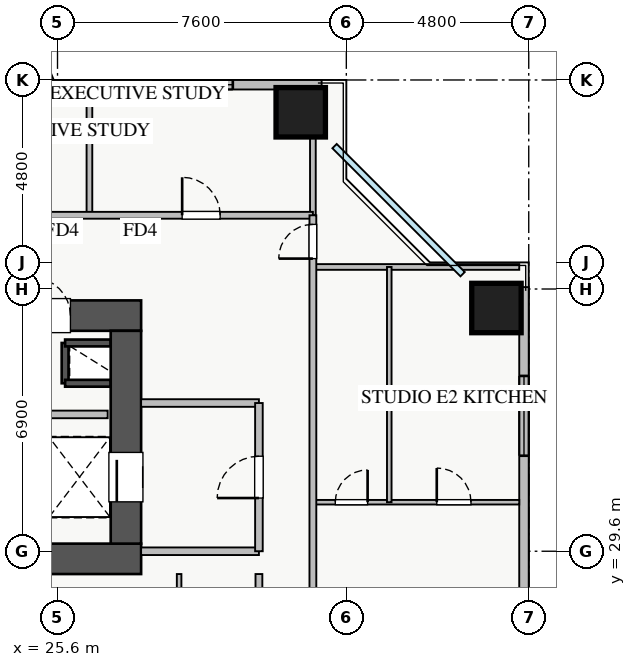
"""IFC4 building model, lengths in metres.
Left out: names, types, materials, properties, quantities, classifications, styles, units other than length and angle.
Written with IfcOpenShell. Run it as: python <this file> out.ifc"""

import sys

from ifc_helpers import new_model, si_unit, direction, frame, frame_2d, origin, origin_2d, place, context, subcontext, project, spatial, rectangle, extrude, source, transform, mapped, element, fill, save


model = new_model("IFC4")
c1 = context("Model", 3, precision=1e-05, world=origin(), true_north=direction((0.0, 1.0)))
c2 = subcontext(c1, "Body", "Model", "MODEL_VIEW")
j1 = project(units=[si_unit("LENGTHUNIT", "METRE"), si_unit("PLANEANGLEUNIT", "RADIAN")], contexts=[c1])
p1 = place(None, origin())
s1 = spatial("IfcSite", under=j1, at=p1, CompositionType="ELEMENT")
p2 = place(p1, origin())
s2 = spatial("IfcBuilding", under=s1, at=p2, CompositionType="ELEMENT")
p3 = place(p2, frame((0.0, 0.0, 76.25)))
s3 = spatial("IfcBuildingStorey", under=s2, at=p3, CompositionType="ELEMENT", Elevation=76.25)
p4 = place(p3, frame((25.8, 34.02, 0.0), z_axis=(0.0, 0.0, 1.0), x_axis=(0.0, 1.0, 0.0)))
e1 = element("IfcWall", 1, at=p4, inside=s3, PredefinedType="SHEAR", context=c2, shape_type="SweptSolid", body=[
    extrude(rectangle(XDim=1.06, YDim=0.18, at=frame_2d((0.53, 0.0))), origin(), (0.0, 0.0, 1.0), 3.07),
])
for number, where, z_axis, x_axis in (
    (2, (25.8, 35.08, 0.0), (0.0, 0.0, 1.0), (1.0, 0.0, 0.0)),
    (3, (25.8, 34.02, 0.0), (0.0, 0.0, 1.0), (1.0, 0.0, 0.0)),
):
    element("IfcWall", number, at=place(p3, frame(where, z_axis=z_axis, x_axis=x_axis)), inside=s3, PredefinedType="SHEAR", context=c2, shape_type="SweptSolid", body=[
        extrude(rectangle(XDim=1.2, YDim=0.18, at=frame_2d((0.6, 0.0))), origin(), (0.0, 0.0, 1.0), 3.07),
    ])
p5 = place(p3, frame((10.2, 29.4, 0.0), z_axis=(0.0, 0.0, 1.0), x_axis=(1.0, 0.0, 0.0)))
e4 = element("IfcWall", 4, at=p5, inside=s3, PredefinedType="SHEAR", context=c2, shape_type="SweptSolid", body=[
    extrude(rectangle(XDim=17.6, YDim=0.8, at=frame_2d((8.8, 0.0))), origin(), (0.0, 0.0, 1.0), 3.25),
])
p6 = place(p3, frame((10.2, 35.8, 0.0), z_axis=(0.0, 0.0, 1.0), x_axis=(1.0, 0.0, 0.0)))
e5 = element("IfcWall", 5, at=p6, inside=s3, PredefinedType="SHEAR", context=c2, shape_type="SweptSolid", body=[
    extrude(rectangle(XDim=17.6, YDim=0.8, at=frame_2d((8.8, 0.0))), origin(), (0.0, 0.0, 1.0), 3.25),
])
p7 = place(p6, frame((1.15, 0.0, 0.0)))
e6 = element("IfcOpeningElement", 6, at=p7, cuts=e5, PredefinedType="OPENING", context=c2, shape_type="SweptSolid", body=[
    extrude(rectangle(XDim=1.1, YDim=2.05, at=frame_2d((0.55, 1.025))), frame((0.0, 0.41, 0.0), z_axis=(0.0, -1.0, 0.0), x_axis=(1.0, 0.0, 0.0)), (0.0, 0.0, 1.0), 0.82),
])
p8 = place(p6, frame((8.3, 0.0, 0.0)))
e7 = element("IfcOpeningElement", 7, at=p8, cuts=e5, PredefinedType="OPENING", context=c2, shape_type="SweptSolid", body=[
    extrude(rectangle(XDim=1.1, YDim=2.05, at=frame_2d((0.55, 1.025))), frame((0.0, 0.41, 0.0), z_axis=(0.0, -1.0, 0.0), x_axis=(1.0, 0.0, 0.0)), (0.0, 0.0, 1.0), 0.82),
])
p9 = place(p6, frame((10.05, 0.0, 0.0)))
e8 = element("IfcOpeningElement", 8, at=p9, cuts=e5, PredefinedType="OPENING", context=c2, shape_type="SweptSolid", body=[
    extrude(rectangle(XDim=1.1, YDim=2.05, at=frame_2d((0.55, 1.025))), frame((0.0, 0.41, 0.0), z_axis=(0.0, -1.0, 0.0), x_axis=(1.0, 0.0, 0.0)), (0.0, 0.0, 1.0), 0.82),
])
p10 = place(p6, frame((14.74, 0.0, 0.0)))
e9 = element("IfcOpeningElement", 9, at=p10, cuts=e5, PredefinedType="OPENING", context=c2, shape_type="SweptSolid", body=[
    extrude(rectangle(XDim=1.0, YDim=2.05, at=frame_2d((0.5, 1.025))), frame((0.0, 0.41, 0.0), z_axis=(0.0, -1.0, 0.0), x_axis=(1.0, 0.0, 0.0)), (0.0, 0.0, 1.0), 0.82),
])
p11 = place(p6, frame((12.585, 0.0, 0.0)))
e10 = element("IfcOpeningElement", 10, at=p11, cuts=e5, PredefinedType="OPENING", context=c2, shape_type="SweptSolid", body=[
    extrude(rectangle(XDim=1.0, YDim=2.05, at=frame_2d((0.5, 1.025))), frame((0.0, 0.41, 0.0), z_axis=(0.0, -1.0, 0.0), x_axis=(1.0, 0.0, 0.0)), (0.0, 0.0, 1.0), 0.82),
])
p12 = place(p3, frame((27.4, 29.8, 0.0), z_axis=(0.0, 0.0, 1.0), x_axis=(0.0, 1.0, 0.0)))
e11 = element("IfcWall", 11, at=p12, inside=s3, PredefinedType="SHEAR", context=c2, shape_type="SweptSolid", body=[
    extrude(rectangle(XDim=5.6, YDim=0.8, at=frame_2d((2.8, 0.0))), origin(), (0.0, 0.0, 1.0), 3.25),
])
p13 = place(p12, frame((1.1, 0.0, 0.0)))
e12 = element("IfcOpeningElement", 12, at=p13, cuts=e11, PredefinedType="OPENING", context=c2, shape_type="SweptSolid", body=[
    extrude(rectangle(XDim=1.3, YDim=2.05, at=frame_2d((0.65, 1.025))), frame((0.0, 0.41, 0.0), z_axis=(0.0, -1.0, 0.0), x_axis=(1.0, 0.0, 0.0)), (0.0, 0.0, 1.0), 0.82),
])
m1 = source(origin(), c2, "Body", "SweptSolid", [
    extrude(rectangle(XDim=1.3, YDim=1.3, at=origin_2d()), origin(), (0.0, 0.0, 1.0), 3.25),
])
for number, where, z_axis, x_axis in (
    (13, (37.15, 36.0, 0.0), (0.0, 0.0, 1.0), (1.0, 0.0, 0.0)),
    (14, (32.0, 41.15, 0.0), (0.0, 0.0, 1.0), (1.0, 0.0, 0.0)),
):
    element("IfcColumn", number, at=place(p3, frame(where, z_axis=z_axis, x_axis=x_axis)), inside=s3, PredefinedType="COLUMN", context=c2, shape_type="MappedRepresentation", body=[
        mapped(m1, transform((0.0, 0.0, 0.0), x_axis=(1.0, 0.0, 0.0), y_axis=(0.0, 1.0, 0.0), z_axis=(0.0, 0.0, 1.0), scale=1.0)),
    ])
p14 = place(p3, frame((5.45, 41.875, 0.0), z_axis=(0.0, 0.0, 1.0), x_axis=(1.0, 0.0, 0.0)))
e15 = element("IfcWall", 15, at=p14, inside=s3, PredefinedType="STANDARD", context=c2, shape_type="SweptSolid", body=[
    extrude(rectangle(XDim=27.1, YDim=0.25, at=frame_2d((13.55, 0.0))), origin(), (0.0, 0.0, 1.0), 2.61),
])
p15 = place(p14, frame((14.4, 0.0, 0.0)))
e16 = element("IfcOpeningElement", 16, at=p15, cuts=e15, PredefinedType="OPENING", context=c2, shape_type="SweptSolid", body=[
    extrude(rectangle(XDim=1.2, YDim=2.1, at=frame_2d((0.6, 1.05))), frame((0.0, 0.135, 0.0), z_axis=(0.0, -1.0, 0.0), x_axis=(1.0, 0.0, 0.0)), (0.0, 0.0, 1.0), 0.27),
])
p16 = place(p14, frame((1.48, 0.0, 0.9)))
e17 = element("IfcOpeningElement", 17, at=p16, cuts=e15, PredefinedType="OPENING", context=c2, shape_type="SweptSolid", body=[
    extrude(rectangle(XDim=1.5, YDim=1.5, at=frame_2d((0.75, 0.75))), frame((0.0, 0.135, 0.0), z_axis=(0.0, -1.0, 0.0), x_axis=(1.0, 0.0, 0.0)), (0.0, 0.0, 1.0), 0.27),
])
p17 = place(p14, frame((7.725, 0.0, 0.9)))
e18 = element("IfcOpeningElement", 18, at=p17, cuts=e15, PredefinedType="OPENING", context=c2, shape_type="SweptSolid", body=[
    extrude(rectangle(XDim=1.8, YDim=1.5, at=frame_2d((0.9, 0.75))), frame((0.0, 0.135, 0.0), z_axis=(0.0, -1.0, 0.0), x_axis=(1.0, 0.0, 0.0)), (0.0, 0.0, 1.0), 0.27),
])
p18 = place(p14, frame((17.92, 0.0, 0.9)))
e19 = element("IfcOpeningElement", 19, at=p18, cuts=e15, PredefinedType="OPENING", context=c2, shape_type="SweptSolid", body=[
    extrude(rectangle(XDim=1.5, YDim=1.5, at=frame_2d((0.75, 0.75))), frame((0.0, 0.135, 0.0), z_axis=(0.0, -1.0, 0.0), x_axis=(1.0, 0.0, 0.0)), (0.0, 0.0, 1.0), 0.27),
])
p19 = place(p14, frame((22.663, 0.0, 0.9)))
e20 = element("IfcOpeningElement", 20, at=p19, cuts=e15, PredefinedType="OPENING", context=c2, shape_type="SweptSolid", body=[
    extrude(rectangle(XDim=2.1, YDim=1.48, at=frame_2d((1.05, 0.74))), frame((0.0, 0.135, 0.0), z_axis=(0.0, -1.0, 0.0), x_axis=(1.0, 0.0, 0.0)), (0.0, 0.0, 1.0), 0.27),
])
p20 = place(p14, frame((5.114, 0.0, 0.9)))
e21 = element("IfcOpeningElement", 21, at=p20, cuts=e15, PredefinedType="OPENING", context=c2, shape_type="SweptSolid", body=[
    extrude(rectangle(XDim=2.4, YDim=1.5, at=frame_2d((1.2, 0.75))), frame((0.0, 0.135, 0.0), z_axis=(0.0, -1.0, 0.0), x_axis=(1.0, 0.0, 0.0)), (0.0, 0.0, 1.0), 0.27),
])
p21 = place(p14, frame((10.893, 0.0, 0.9)))
e22 = element("IfcOpeningElement", 22, at=p21, cuts=e15, PredefinedType="OPENING", context=c2, shape_type="SweptSolid", body=[
    extrude(rectangle(XDim=2.4, YDim=1.5, at=frame_2d((1.2, 0.75))), frame((0.0, 0.135, 0.0), z_axis=(0.0, -1.0, 0.0), x_axis=(1.0, 0.0, 0.0)), (0.0, 0.0, 1.0), 0.27),
])
p22 = place(p3, frame((37.875, 9.45, 0.0), z_axis=(0.0, 0.0, 1.0), x_axis=(0.0, 1.0, 0.0)))
e23 = element("IfcWall", 23, at=p22, inside=s3, PredefinedType="STANDARD", context=c2, shape_type="SweptSolid", body=[
    extrude(rectangle(XDim=27.1, YDim=0.25, at=frame_2d((13.55, 0.0))), origin(), (0.0, 0.0, 1.0), 2.61),
])
p23 = place(p22, frame((14.4, 0.0, 0.0)))
e24 = element("IfcOpeningElement", 24, at=p23, cuts=e23, PredefinedType="OPENING", context=c2, shape_type="SweptSolid", body=[
    extrude(rectangle(XDim=1.2, YDim=2.1, at=frame_2d((0.6, 1.05))), frame((0.0, 0.135, 0.0), z_axis=(0.0, -1.0, 0.0), x_axis=(1.0, 0.0, 0.0)), (0.0, 0.0, 1.0), 0.27),
])
p24 = place(p22, frame((2.188, 0.0, 0.9)))
e25 = element("IfcOpeningElement", 25, at=p24, cuts=e23, PredefinedType="OPENING", context=c2, shape_type="SweptSolid", body=[
    extrude(rectangle(XDim=2.4, YDim=1.48, at=frame_2d((1.2, 0.74))), frame((0.0, 0.135, 0.0), z_axis=(0.0, -1.0, 0.0), x_axis=(1.0, 0.0, 0.0)), (0.0, 0.0, 1.0), 0.27),
])
p25 = place(p22, frame((22.663, 0.0, 0.9)))
e26 = element("IfcOpeningElement", 26, at=p25, cuts=e23, PredefinedType="OPENING", context=c2, shape_type="SweptSolid", body=[
    extrude(rectangle(XDim=2.1, YDim=1.48, at=frame_2d((1.05, 0.74))), frame((0.0, 0.135, 0.0), z_axis=(0.0, -1.0, 0.0), x_axis=(1.0, 0.0, 0.0)), (0.0, 0.0, 1.0), 0.27),
])
p26 = place(p22, frame((17.365, 0.0, 0.9)))
e27 = element("IfcOpeningElement", 27, at=p26, cuts=e23, PredefinedType="OPENING", context=c2, shape_type="SweptSolid", body=[
    extrude(rectangle(XDim=0.9, YDim=1.2, at=frame_2d((0.45, 0.6))), frame((0.0, 0.135, 0.0), z_axis=(0.0, -1.0, 0.0), x_axis=(1.0, 0.0, 0.0)), (0.0, 0.0, 1.0), 0.27),
])
for number, where, z_axis, x_axis in (
    (28, (27.8, 29.6, 0.0), (0.0, 0.0, 1.0), (1.0, 0.0, 0.0)),
    (29, (27.8, 33.5, 0.0), (0.0, 0.0, 1.0), (1.0, 0.0, 0.0)),
):
    element("IfcWall", number, at=place(p3, frame(where, z_axis=z_axis, x_axis=x_axis)), inside=s3, PredefinedType="PARTITIONING", context=c2, shape_type="SweptSolid", body=[
        extrude(rectangle(XDim=3.1, YDim=0.2, at=frame_2d((1.55, 0.0))), origin(), (0.0, 0.0, 1.0), 3.07),
    ])
p27 = place(p3, frame((30.9, 29.6, 0.0), z_axis=(0.0, 0.0, 1.0), x_axis=(0.0, 1.0, 0.0)))
e30 = element("IfcWall", 30, at=p27, inside=s3, PredefinedType="PARTITIONING", context=c2, shape_type="SweptSolid", body=[
    extrude(rectangle(XDim=3.9, YDim=0.2, at=frame_2d((1.95, 0.0))), origin(), (0.0, 0.0, 1.0), 3.07),
])
p28 = place(p27, frame((1.4, 0.0, 0.0)))
e31 = element("IfcOpeningElement", 31, at=p28, cuts=e30, PredefinedType="OPENING", context=c2, shape_type="SweptSolid", body=[
    extrude(rectangle(XDim=1.1, YDim=2.05, at=frame_2d((0.55, 1.025))), frame((0.0, 0.11, 0.0), z_axis=(0.0, -1.0, 0.0), x_axis=(1.0, 0.0, 0.0)), (0.0, 0.0, 1.0), 0.22),
])
p29 = place(p3, frame((21.75, 33.2, 0.0), z_axis=(0.0, 0.0, 1.0), x_axis=(1.0, 0.0, 0.0)))
e32 = element("IfcWall", 32, at=p29, inside=s3, PredefinedType="PARTITIONING", context=c2, shape_type="SweptSolid", body=[
    extrude(rectangle(XDim=5.17, YDim=0.2, at=frame_2d((2.585, 0.0))), origin(), (0.0, 0.0, 1.0), 3.07),
])
for number, where, z_axis, x_axis in (
    (33, (26.44, 38.44, 0.0), (0.0, 0.0, 1.0), (0.0, 1.0, 0.0)),
    (34, (32.32, 38.44, 0.0), (0.0, 0.0, 1.0), (0.0, 1.0, 0.0)),
):
    element("IfcWall", number, at=place(p3, frame(where, z_axis=z_axis, x_axis=x_axis)), inside=s3, PredefinedType="PARTITIONING", context=c2, shape_type="SweptSolid", body=[
        extrude(rectangle(XDim=3.31, YDim=0.15, at=frame_2d((1.655, 0.0))), origin(), (0.0, 0.0, 1.0), 3.07),
    ])
p30 = place(p3, frame((8.78, 38.44, 0.0), z_axis=(0.0, 0.0, 1.0), x_axis=(1.0, 0.0, 0.0)))
e35 = element("IfcWall", 35, at=p30, inside=s3, PredefinedType="PARTITIONING", context=c2, shape_type="SweptSolid", body=[
    extrude(rectangle(XDim=23.54, YDim=0.18, at=frame_2d((11.77, 0.0))), origin(), (0.0, 0.0, 1.0), 3.07),
])
p31 = place(p30, frame((2.72, 0.0, 0.0)))
e36 = element("IfcOpeningElement", 36, at=p31, cuts=e35, PredefinedType="OPENING", context=c2, shape_type="SweptSolid", body=[
    extrude(rectangle(XDim=1.0, YDim=2.05, at=frame_2d((0.5, 1.025))), frame((0.0, 0.1, 0.0), z_axis=(0.0, -1.0, 0.0), x_axis=(1.0, 0.0, 0.0)), (0.0, 0.0, 1.0), 0.2),
])
p32 = place(p30, frame((9.23, 0.0, 0.0)))
e37 = element("IfcOpeningElement", 37, at=p32, cuts=e35, PredefinedType="OPENING", context=c2, shape_type="SweptSolid", body=[
    extrude(rectangle(XDim=1.0, YDim=2.05, at=frame_2d((0.5, 1.025))), frame((0.0, 0.1, 0.0), z_axis=(0.0, -1.0, 0.0), x_axis=(1.0, 0.0, 0.0)), (0.0, 0.0, 1.0), 0.2),
])
p33 = place(p30, frame((14.84, 0.0, 0.0)))
e38 = element("IfcOpeningElement", 38, at=p33, cuts=e35, PredefinedType="OPENING", context=c2, shape_type="SweptSolid", body=[
    extrude(rectangle(XDim=1.0, YDim=2.05, at=frame_2d((0.5, 1.025))), frame((0.0, 0.1, 0.0), z_axis=(0.0, -1.0, 0.0), x_axis=(1.0, 0.0, 0.0)), (0.0, 0.0, 1.0), 0.2),
])
p34 = place(p30, frame((20.1, 0.0, 0.0)))
e39 = element("IfcOpeningElement", 39, at=p34, cuts=e35, PredefinedType="OPENING", context=c2, shape_type="SweptSolid", body=[
    extrude(rectangle(XDim=1.0, YDim=2.05, at=frame_2d((0.5, 1.025))), frame((0.0, 0.1, 0.0), z_axis=(0.0, -1.0, 0.0), x_axis=(1.0, 0.0, 0.0)), (0.0, 0.0, 1.0), 0.2),
])
p35 = place(p3, frame((32.32, 37.08, 0.0), z_axis=(0.0, 0.0, 1.0), x_axis=(1.0, 0.0, 0.0)))
e40 = element("IfcWall", 40, at=p35, inside=s3, PredefinedType="PARTITIONING", context=c2, shape_type="SweptSolid", body=[
    extrude(rectangle(XDim=5.43, YDim=0.15, at=frame_2d((2.715, 0.0))), origin(), (0.0, 0.0, 1.0), 3.07),
])
p36 = place(p3, frame((32.32, 30.89, 0.0), z_axis=(0.0, 0.0, 1.0), x_axis=(1.0, 0.0, 0.0)))
e41 = element("IfcWall", 41, at=p36, inside=s3, PredefinedType="PLUMBINGWALL", context=c2, shape_type="SweptSolid", body=[
    extrude(rectangle(XDim=5.43, YDim=0.12, at=frame_2d((2.715, 0.0))), origin(), (0.0, 0.0, 1.0), 3.07),
])
p37 = place(p36, frame((0.59, 0.0, 0.0)))
e42 = element("IfcOpeningElement", 42, at=p37, cuts=e41, PredefinedType="OPENING", context=c2, shape_type="SweptSolid", body=[
    extrude(rectangle(XDim=0.85, YDim=2.05, at=frame_2d((0.425, 1.025))), frame((0.0, 0.07, 0.0), z_axis=(0.0, -1.0, 0.0), x_axis=(1.0, 0.0, 0.0)), (0.0, 0.0, 1.0), 0.14),
])
p38 = place(p36, frame((3.26, 0.0, 0.0)))
e43 = element("IfcOpeningElement", 43, at=p38, cuts=e41, PredefinedType="OPENING", context=c2, shape_type="SweptSolid", body=[
    extrude(rectangle(XDim=0.9, YDim=2.05, at=frame_2d((0.45, 1.025))), frame((0.0, 0.07, 0.0), z_axis=(0.0, -1.0, 0.0), x_axis=(1.0, 0.0, 0.0)), (0.0, 0.0, 1.0), 0.14),
])
p39 = place(p3, frame((34.33, 30.89, 0.0), z_axis=(0.0, 0.0, 1.0), x_axis=(0.0, 1.0, 0.0)))
e44 = element("IfcWall", 44, at=p39, inside=s3, PredefinedType="PLUMBINGWALL", context=c2, shape_type="SweptSolid", body=[
    extrude(rectangle(XDim=6.19, YDim=0.12, at=frame_2d((3.095, 0.0))), origin(), (0.0, 0.0, 1.0), 3.07),
])
p40 = place(p3, frame((32.32, 7.21, 0.0), z_axis=(0.0, 0.0, 1.0), x_axis=(0.0, 1.0, 0.0)))
e45 = element("IfcWall", 45, at=p40, inside=s3, PredefinedType="PARTITIONING", context=c2, shape_type="SweptSolid", body=[
    extrude(rectangle(XDim=31.23, YDim=0.18, at=frame_2d((15.615, 0.0))), origin(), (0.0, 0.0, 1.0), 2.815),
])
p41 = place(p40, frame((30.09, 0.0, 0.0)))
e46 = element("IfcOpeningElement", 46, at=p41, cuts=e45, PredefinedType="OPENING", context=c2, shape_type="SweptSolid", body=[
    extrude(rectangle(XDim=0.9, YDim=2.05, at=frame_2d((0.45, 1.025))), frame((0.0, 0.1, 0.0), z_axis=(0.0, -1.0, 0.0), x_axis=(1.0, 0.0, 0.0)), (0.0, 0.0, 1.0), 0.2),
])
p42 = place(p40, frame((0.415, 0.0, 0.0)))
e47 = element("IfcOpeningElement", 47, at=p42, cuts=e45, PredefinedType="OPENING", context=c2, shape_type="SweptSolid", body=[
    extrude(rectangle(XDim=0.9, YDim=2.05, at=frame_2d((0.45, 1.025))), frame((0.0, 0.1, 0.0), z_axis=(0.0, -1.0, 0.0), x_axis=(1.0, 0.0, 0.0)), (0.0, 0.0, 1.0), 0.2),
])
p43 = place(p40, frame((4.99, 0.0, 0.0)))
e48 = element("IfcOpeningElement", 48, at=p43, cuts=e45, PredefinedType="OPENING", context=c2, shape_type="SweptSolid", body=[
    extrude(rectangle(XDim=1.0, YDim=2.05, at=frame_2d((0.5, 1.025))), frame((0.0, 0.1, 0.0), z_axis=(0.0, -1.0, 0.0), x_axis=(1.0, 0.0, 0.0)), (0.0, 0.0, 1.0), 0.2),
])
p44 = place(p40, frame((19.355, 0.0, 0.0)))
e49 = element("IfcOpeningElement", 49, at=p44, cuts=e45, PredefinedType="OPENING", context=c2, shape_type="SweptSolid", body=[
    extrude(rectangle(XDim=1.0, YDim=2.05, at=frame_2d((0.5, 1.025))), frame((0.0, 0.1, 0.0), z_axis=(0.0, -1.0, 0.0), x_axis=(1.0, 0.0, 0.0)), (0.0, 0.0, 1.0), 0.2),
])
p45 = place(p3, frame((28.8, 23.1, 0.0), z_axis=(0.0, 0.0, 1.0), x_axis=(0.0, 1.0, 0.0)))
e50 = element("IfcWall", 50, at=p45, inside=s3, PredefinedType="PLUMBINGWALL", context=c2, shape_type="SweptSolid", body=[
    extrude(rectangle(XDim=5.9, YDim=0.12, at=frame_2d((2.95, 0.0))), origin(), (0.0, 0.0, 1.0), 3.07),
])
p46 = place(p3, frame((30.9, 17.0, 0.0), z_axis=(0.0, 0.0, 1.0), x_axis=(0.0, 1.0, 0.0)))
e51 = element("IfcWall", 51, at=p46, inside=s3, PredefinedType="PARTITIONING", context=c2, shape_type="SweptSolid", body=[
    extrude(rectangle(XDim=12.0, YDim=0.18, at=frame_2d((6.0, 0.0))), origin(), (0.0, 0.0, 1.0), 3.07),
])
p47 = place(p46, frame((2.36, 0.0, 0.0)))
e52 = element("IfcOpeningElement", 52, at=p47, cuts=e51, PredefinedType="OPENING", context=c2, shape_type="SweptSolid", body=[
    extrude(rectangle(XDim=1.0, YDim=2.05, at=frame_2d((0.5, 1.025))), frame((0.0, 0.1, 0.0), z_axis=(0.0, -1.0, 0.0), x_axis=(1.0, 0.0, 0.0)), (0.0, 0.0, 1.0), 0.2),
])
m2 = source(origin(), c2, "Body", "SweptSolid", [
    extrude(rectangle(XDim=2.1, YDim=1.48, at=frame_2d((1.05, 0.74))), frame((0.0, 0.03, 0.0), z_axis=(0.0, -1.0, 0.0), x_axis=(1.0, 0.0, 0.0)), (0.0, 0.0, 1.0), 0.06),
])
p48 = place(p19, origin())
e53 = element("IfcWindow", 53, at=p48, inside=s3, PartitioningType="TRIPLE_PANEL_VERTICAL", PredefinedType="WINDOW", context=c2, shape_type="MappedRepresentation", body=[
    mapped(m2, transform((0.0, 0.0, 0.0), x_axis=(1.0, 0.0, 0.0), y_axis=(0.0, 1.0, 0.0), z_axis=(0.0, 0.0, 1.0), scale=1.0)),
])
fill(e20, e53)
p49 = place(p25, origin())
e54 = element("IfcWindow", 54, at=p49, inside=s3, PartitioningType="TRIPLE_PANEL_VERTICAL", PredefinedType="WINDOW", context=c2, shape_type="MappedRepresentation", body=[
    mapped(m2, transform((0.0, 0.0, 0.0), x_axis=(1.0, 0.0, 0.0), y_axis=(0.0, 1.0, 0.0), z_axis=(0.0, 0.0, 1.0), scale=1.0)),
])
fill(e26, e54)
m3 = source(origin(), c2, "Body", "SweptSolid", [
    extrude(rectangle(XDim=1.3, YDim=2.05, at=frame_2d((0.65, 1.025))), frame((0.0, 0.025, 0.0), z_axis=(0.0, -1.0, 0.0), x_axis=(1.0, 0.0, 0.0)), (0.0, 0.0, 1.0), 0.05),
])
p50 = place(p13, origin())
e55 = element("IfcDoor", 55, at=p50, inside=s3, OperationType="SLIDING_TO_LEFT", PredefinedType="DOOR", context=c2, shape_type="MappedRepresentation", body=[
    mapped(m3, transform((0.0, 0.0, 0.0), x_axis=(1.0, 0.0, 0.0), y_axis=(0.0, 1.0, 0.0), z_axis=(0.0, 0.0, 1.0), scale=1.0)),
])
fill(e12, e55)
m4 = source(origin(), c2, "Body", "SweptSolid", [
    extrude(rectangle(XDim=1.0, YDim=2.05, at=frame_2d((0.5, 1.025))), frame((0.0, 0.025, 0.0), z_axis=(0.0, -1.0, 0.0), x_axis=(1.0, 0.0, 0.0)), (0.0, 0.0, 1.0), 0.05),
])
p51 = place(p10, origin())
e56 = element("IfcDoor", 56, at=p51, inside=s3, OperationType="SINGLE_SWING_LEFT", PredefinedType="DOOR", context=c2, shape_type="MappedRepresentation", body=[
    mapped(m4, transform((0.0, 0.0, 0.0), x_axis=(1.0, 0.0, 0.0), y_axis=(0.0, 1.0, 0.0), z_axis=(0.0, 0.0, 1.0), scale=1.0)),
])
fill(e9, e56)
m5 = source(origin(), c2, "Body", "SweptSolid", [
    extrude(rectangle(XDim=1.1, YDim=2.05, at=frame_2d((0.55, 1.025))), frame((0.0, 0.025, 0.0), z_axis=(0.0, -1.0, 0.0), x_axis=(1.0, 0.0, 0.0)), (0.0, 0.0, 1.0), 0.05),
])
p52 = place(p28, origin())
e57 = element("IfcDoor", 57, at=p52, inside=s3, OperationType="SINGLE_SWING_LEFT", PredefinedType="DOOR", context=c2, shape_type="MappedRepresentation", body=[
    mapped(m5, transform((0.0, 0.0, 0.0), x_axis=(1.0, 0.0, 0.0), y_axis=(0.0, 1.0, 0.0), z_axis=(0.0, 0.0, 1.0), scale=1.0)),
])
fill(e31, e57)
p53 = place(p34, origin())
e58 = element("IfcDoor", 58, at=p53, inside=s3, OperationType="SINGLE_SWING_LEFT", PredefinedType="DOOR", context=c2, shape_type="MappedRepresentation", body=[
    mapped(m4, transform((0.0, 0.0, 0.0), x_axis=(1.0, 0.0, 0.0), y_axis=(0.0, 1.0, 0.0), z_axis=(0.0, 0.0, 1.0), scale=1.0)),
])
fill(e39, e58)
m6 = source(origin(), c2, "Body", "SweptSolid", [
    extrude(rectangle(XDim=0.85, YDim=2.05, at=frame_2d((0.425, 1.025))), frame((0.0, 0.025, 0.0), z_axis=(0.0, -1.0, 0.0), x_axis=(1.0, 0.0, 0.0)), (0.0, 0.0, 1.0), 0.05),
])
p54 = place(p37, origin())
e59 = element("IfcDoor", 59, at=p54, inside=s3, OperationType="SINGLE_SWING_RIGHT", PredefinedType="DOOR", context=c2, shape_type="MappedRepresentation", body=[
    mapped(m6, transform((0.0, 0.0, 0.0), x_axis=(1.0, 0.0, 0.0), y_axis=(0.0, 1.0, 0.0), z_axis=(0.0, 0.0, 1.0), scale=1.0)),
])
fill(e42, e59)
m7 = source(origin(), c2, "Body", "SweptSolid", [
    extrude(rectangle(XDim=0.9, YDim=2.05, at=frame_2d((0.45, 1.025))), frame((0.0, 0.025, 0.0), z_axis=(0.0, -1.0, 0.0), x_axis=(1.0, 0.0, 0.0)), (0.0, 0.0, 1.0), 0.05),
])
p55 = place(p38, origin())
e60 = element("IfcDoor", 60, at=p55, inside=s3, OperationType="SINGLE_SWING_LEFT", PredefinedType="DOOR", context=c2, shape_type="MappedRepresentation", body=[
    mapped(m7, transform((0.0, 0.0, 0.0), x_axis=(1.0, 0.0, 0.0), y_axis=(0.0, 1.0, 0.0), z_axis=(0.0, 0.0, 1.0), scale=1.0)),
])
fill(e43, e60)
p56 = place(p41, origin())
e61 = element("IfcDoor", 61, at=p56, inside=s3, OperationType="SINGLE_SWING_LEFT", PredefinedType="DOOR", context=c2, shape_type="MappedRepresentation", body=[
    mapped(m7, transform((0.0, 0.0, 0.0), x_axis=(1.0, 0.0, 0.0), y_axis=(0.0, 1.0, 0.0), z_axis=(0.0, 0.0, 1.0), scale=1.0)),
])
fill(e46, e61)
save(model, sys.argv[1])
